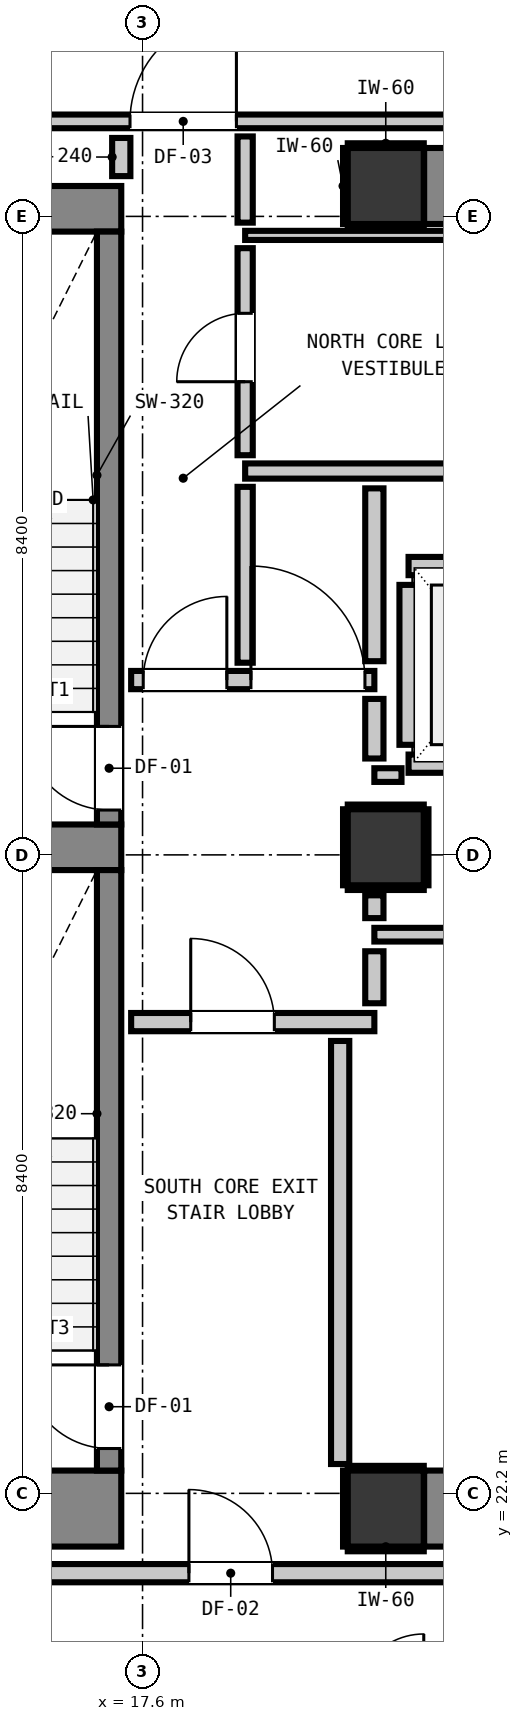
"""IFC4 building model, lengths in metres.
Left out: names, types, materials, properties, quantities, classifications, styles, units other than length and angle.
Written with IfcOpenShell. Run it as: python <this file> out.ifc"""

import sys

from ifc_helpers import new_model, si_unit, direction, frame, frame_2d, origin, origin_2d, place, context, subcontext, project, spatial, rectangle, extrude, element, fill, save


model = new_model("IFC4")
c1 = context("Model", 3, precision=1e-05, world=origin(), true_north=direction((0.0, 1.0)))
c2 = subcontext(c1, "Body", "Model", "MODEL_VIEW")
j1 = project(units=[si_unit("LENGTHUNIT", "METRE"), si_unit("PLANEANGLEUNIT", "RADIAN")], contexts=[c1])
p1 = place(None, origin())
s1 = spatial("IfcSite", under=j1, at=p1, CompositionType="ELEMENT")
p2 = place(p1, origin())
s2 = spatial("IfcBuilding", under=s1, at=p2, CompositionType="ELEMENT")
p3 = place(p2, frame((0.0, 0.0, 159.2)))
s3 = spatial("IfcBuildingStorey", under=s2, at=p3, CompositionType="ELEMENT", Elevation=159.2)
for number, where, z_axis, x_axis in (
    (1, (20.8, 22.0, 0.0), (0.0, 0.0, 1.0), (1.0, 0.0, 0.0)),
    (2, (20.8, 39.4, 0.0), (0.0, 0.0, 1.0), (1.0, 0.0, 0.0)),
):
    element("IfcColumn", number, at=place(p3, frame(where, z_axis=z_axis, x_axis=x_axis)), inside=s3, PredefinedType="COLUMN", context=c2, shape_type="SweptSolid", body=[
        extrude(rectangle(XDim=1.0, YDim=1.0, at=origin_2d()), origin(), (0.0, 0.0, 1.0), 3.32),
    ])
p4 = place(p3, frame((13.24, 22.0, 0.0), z_axis=(0.0, 0.0, 1.0), x_axis=(1.0, 0.0, 0.0)))
e3 = element("IfcWall", 3, at=p4, inside=s3, PredefinedType="SHEAR", context=c2, shape_type="SweptSolid", body=[
    extrude(rectangle(XDim=4.08, YDim=1.0, at=frame_2d((2.04, 0.0))), origin(), (0.0, 0.0, 1.0), 3.32),
])
p5 = place(p3, frame((13.24, 39.1, 0.0), z_axis=(0.0, 0.0, 1.0), x_axis=(1.0, 0.0, 0.0)))
e4 = element("IfcWall", 4, at=p5, inside=s3, PredefinedType="SHEAR", context=c2, shape_type="SweptSolid", body=[
    extrude(rectangle(XDim=4.08, YDim=0.6, at=frame_2d((2.04, 0.0))), origin(), (0.0, 0.0, 1.0), 3.32),
])
p6 = place(p3, frame((13.905, 30.7, 0.0), z_axis=(0.0, 0.0, 1.0), x_axis=(1.0, 0.0, 0.0)))
e5 = element("IfcWall", 5, at=p6, inside=s3, PredefinedType="SHEAR", context=c2, shape_type="SweptSolid", body=[
    extrude(rectangle(XDim=3.415, YDim=0.6, at=frame_2d((1.708, 0.0))), origin(), (0.0, 0.0, 1.0), 3.32),
])
for number, where, z_axis, x_axis in (
    (6, (21.305, 22.0, 0.0), (0.0, 0.0, 1.0), (1.0, 0.0, 0.0)),
    (7, (21.305, 39.4, 0.0), (0.0, 0.0, 1.0), (1.0, 0.0, 0.0)),
):
    element("IfcWall", number, at=place(p3, frame(where, z_axis=z_axis, x_axis=x_axis)), inside=s3, PredefinedType="SHEAR", context=c2, shape_type="SweptSolid", body=[
        extrude(rectangle(XDim=7.39, YDim=1.0, at=frame_2d((3.695, 0.0))), origin(), (0.0, 0.0, 1.0), 3.32),
    ])
p7 = place(p3, frame((17.16, 31.0, 0.0), z_axis=(0.0, 0.0, 1.0), x_axis=(0.0, 1.0, 0.0)))
e8 = element("IfcWall", 8, at=p7, inside=s3, PredefinedType="SHEAR", context=c2, shape_type="SweptSolid", body=[
    extrude(rectangle(XDim=7.8, YDim=0.32, at=frame_2d((3.9, 0.0))), origin(), (0.0, 0.0, 1.0), 3.32),
])
p8 = place(p7, frame((0.19, 0.0, 0.0)))
e9 = element("IfcOpeningElement", 9, at=p8, cuts=e8, PredefinedType="OPENING", context=c2, shape_type="SweptSolid", body=[
    extrude(rectangle(XDim=1.1, YDim=2.15, at=frame_2d((0.55, 1.075))), frame((0.0, 0.17, 0.0), z_axis=(0.0, -1.0, 0.0), x_axis=(1.0, 0.0, 0.0)), (0.0, 0.0, 1.0), 0.34),
])
p9 = place(p3, frame((17.16, 22.5, 0.0), z_axis=(0.0, 0.0, 1.0), x_axis=(0.0, 1.0, 0.0)))
e10 = element("IfcWall", 10, at=p9, inside=s3, PredefinedType="SHEAR", context=c2, shape_type="SweptSolid", body=[
    extrude(rectangle(XDim=7.9, YDim=0.32, at=frame_2d((3.95, 0.0))), origin(), (0.0, 0.0, 1.0), 3.32),
])
p10 = place(p9, frame((0.29, 0.0, 0.0)))
e11 = element("IfcOpeningElement", 11, at=p10, cuts=e10, PredefinedType="OPENING", context=c2, shape_type="SweptSolid", body=[
    extrude(rectangle(XDim=1.1, YDim=2.15, at=frame_2d((0.55, 1.075))), frame((0.0, 0.17, 0.0), z_axis=(0.0, -1.0, 0.0), x_axis=(1.0, 0.0, 0.0)), (0.0, 0.0, 1.0), 0.34),
])
p11 = place(p3, frame((20.8, 30.7, 0.0), z_axis=(0.0, 0.0, 1.0), x_axis=(1.0, 0.0, 0.0)))
e12 = element("IfcColumn", 12, at=p11, inside=s3, PredefinedType="COLUMN", context=c2, shape_type="SweptSolid", body=[
    extrude(rectangle(XDim=1.0, YDim=1.0, at=origin_2d()), origin(), (0.0, 0.0, 1.0), 3.32),
])
for number, where, z_axis, x_axis in (
    (13, (21.1, 31.8, 0.0), (0.0, 0.0, 1.0), (1.0, 0.0, 0.0)),
    (14, (21.1, 34.4, 0.0), (0.0, 0.0, 1.0), (1.0, 0.0, 0.0)),
):
    element("IfcWall", number, at=place(p3, frame(where, z_axis=z_axis, x_axis=x_axis)), inside=s3, PredefinedType="PARTITIONING", context=c2, shape_type="SweptSolid", body=[
        extrude(rectangle(XDim=2.2, YDim=0.24, at=frame_2d((1.1, 0.0))), origin(), (0.0, 0.0, 1.0), 3.08),
    ])
p12 = place(p3, frame((21.1, 32.048, 0.0), z_axis=(0.0, 0.0, 1.0), x_axis=(0.0, 1.0, 0.0)))
e15 = element("IfcWall", 15, at=p12, inside=s3, PredefinedType="PARTITIONING", context=c2, shape_type="SweptSolid", body=[
    extrude(rectangle(XDim=2.104, YDim=0.24, at=frame_2d((1.052, 0.0))), origin(), (0.0, 0.0, 1.0), 2.315),
])
p13 = place(p3, frame((9.407, 21.15, 0.0), z_axis=(0.0, 0.0, 1.0), x_axis=(1.0, 0.0, 0.0)))
e16 = element("IfcWall", 16, at=p13, inside=s3, PredefinedType="PARTITIONING", context=c2, shape_type="SweptSolid", body=[
    extrude(rectangle(XDim=27.532, YDim=0.24, at=frame_2d((13.766, 0.0))), origin(), (0.0, 0.0, 1.0), 3.08),
])
p14 = place(p13, frame((8.803, 0.0, 0.0)))
e17 = element("IfcOpeningElement", 17, at=p14, cuts=e16, PredefinedType="OPENING", context=c2, shape_type="SweptSolid", body=[
    extrude(rectangle(XDim=1.1, YDim=2.15, at=frame_2d((0.55, 1.075))), frame((0.0, 0.13, 0.0), z_axis=(0.0, -1.0, 0.0), x_axis=(1.0, 0.0, 0.0)), (0.0, 0.0, 1.0), 0.26),
])
p15 = place(p13, frame((1.192, 0.0, 0.0)))
e18 = element("IfcOpeningElement", 18, at=p15, cuts=e16, PredefinedType="OPENING", context=c2, shape_type="SweptSolid", body=[
    extrude(rectangle(XDim=1.4, YDim=2.15, at=frame_2d((0.7, 1.075))), frame((0.0, 0.13, 0.0), z_axis=(0.0, -1.0, 0.0), x_axis=(1.0, 0.0, 0.0)), (0.0, 0.0, 1.0), 0.26),
])
p16 = place(p3, frame((17.45, 28.4, 0.0), z_axis=(0.0, 0.0, 1.0), x_axis=(1.0, 0.0, 0.0)))
e19 = element("IfcWall", 19, at=p16, inside=s3, PredefinedType="PARTITIONING", context=c2, shape_type="SweptSolid", body=[
    extrude(rectangle(XDim=3.2, YDim=0.24, at=frame_2d((1.6, 0.0))), origin(), (0.0, 0.0, 1.0), 3.08),
])
p17 = place(p16, frame((0.784, 0.0, 0.0)))
e20 = element("IfcOpeningElement", 20, at=p17, cuts=e19, PredefinedType="OPENING", context=c2, shape_type="SweptSolid", body=[
    extrude(rectangle(XDim=1.1, YDim=2.15, at=frame_2d((0.55, 1.075))), frame((0.0, 0.13, 0.0), z_axis=(0.0, -1.0, 0.0), x_axis=(1.0, 0.0, 0.0)), (0.0, 0.0, 1.0), 0.26),
])
p18 = place(p3, frame((17.45, 32.9, 0.0), z_axis=(0.0, 0.0, 1.0), x_axis=(1.0, 0.0, 0.0)))
e21 = element("IfcWall", 21, at=p18, inside=s3, PredefinedType="PARTITIONING", context=c2, shape_type="SweptSolid", body=[
    extrude(rectangle(XDim=3.2, YDim=0.24, at=frame_2d((1.6, 0.0))), origin(), (0.0, 0.0, 1.0), 3.08),
])
p19 = place(p18, frame((0.159, 0.0, 0.0)))
e22 = element("IfcOpeningElement", 22, at=p19, cuts=e21, PredefinedType="OPENING", context=c2, shape_type="SweptSolid", body=[
    extrude(rectangle(XDim=1.1, YDim=2.15, at=frame_2d((0.55, 1.075))), frame((0.0, 0.13, 0.0), z_axis=(0.0, -1.0, 0.0), x_axis=(1.0, 0.0, 0.0)), (0.0, 0.0, 1.0), 0.26),
])
p20 = place(p18, frame((1.576, 0.0, 0.0)))
e23 = element("IfcOpeningElement", 23, at=p20, cuts=e21, PredefinedType="OPENING", context=c2, shape_type="SweptSolid", body=[
    extrude(rectangle(XDim=1.5, YDim=2.15, at=frame_2d((0.75, 1.075))), frame((0.0, 0.13, 0.0), z_axis=(0.0, -1.0, 0.0), x_axis=(1.0, 0.0, 0.0)), (0.0, 0.0, 1.0), 0.26),
])
p21 = place(p3, frame((18.95, 35.65, 0.0), z_axis=(0.0, 0.0, 1.0), x_axis=(1.0, 0.0, 0.0)))
e24 = element("IfcWall", 24, at=p21, inside=s3, PredefinedType="PARTITIONING", context=c2, shape_type="SweptSolid", body=[
    extrude(rectangle(XDim=11.025, YDim=0.2, at=frame_2d((5.513, 0.0))), origin(), (0.0, 0.0, 1.0), 3.08),
])
p22 = place(p3, frame((20.65, 29.55, 0.0), z_axis=(0.0, 0.0, 1.0), x_axis=(1.0, 0.0, 0.0)))
e25 = element("IfcWall", 25, at=p22, inside=s3, PredefinedType="PARTITIONING", context=c2, shape_type="SweptSolid", body=[
    extrude(rectangle(XDim=9.325, YDim=0.18, at=frame_2d((4.663, 0.0))), origin(), (0.0, 0.0, 1.0), 3.08),
])
p23 = place(p3, frame((20.65, 31.65, 0.0), z_axis=(0.0, 0.0, 1.0), x_axis=(1.0, 0.0, 0.0)))
e26 = element("IfcWall", 26, at=p23, inside=s3, PredefinedType="PARTITIONING", context=c2, shape_type="SweptSolid", body=[
    extrude(rectangle(XDim=0.357, YDim=0.18, at=frame_2d((0.179, 0.0))), origin(), (0.0, 0.0, 1.0), 3.08),
])
p24 = place(p3, frame((9.407, 40.25, 0.0), z_axis=(0.0, 0.0, 1.0), x_axis=(1.0, 0.0, 0.0)))
e27 = element("IfcWall", 27, at=p24, inside=s3, PredefinedType="PARTITIONING", context=c2, shape_type="SweptSolid", body=[
    extrude(rectangle(XDim=39.386, YDim=0.18, at=frame_2d((19.693, 0.0))), origin(), (0.0, 0.0, 1.0), 3.08),
])
p25 = place(p24, frame((8.028, 0.0, 0.0)))
e28 = element("IfcOpeningElement", 28, at=p25, cuts=e27, PredefinedType="OPENING", context=c2, shape_type="SweptSolid", body=[
    extrude(rectangle(XDim=1.4, YDim=2.15, at=frame_2d((0.7, 1.075))), frame((0.0, 0.1, 0.0), z_axis=(0.0, -1.0, 0.0), x_axis=(1.0, 0.0, 0.0)), (0.0, 0.0, 1.0), 0.2),
])
p26 = place(p24, frame((1.192, 0.0, 0.0)))
e29 = element("IfcOpeningElement", 29, at=p26, cuts=e27, PredefinedType="OPENING", context=c2, shape_type="SweptSolid", body=[
    extrude(rectangle(XDim=1.4, YDim=2.15, at=frame_2d((0.7, 1.075))), frame((0.0, 0.1, 0.0), z_axis=(0.0, -1.0, 0.0), x_axis=(1.0, 0.0, 0.0)), (0.0, 0.0, 1.0), 0.2),
])
p27 = place(p24, frame((28.643, 0.0, 0.0)))
e30 = element("IfcOpeningElement", 30, at=p27, cuts=e27, PredefinedType="OPENING", context=c2, shape_type="SweptSolid", body=[
    extrude(rectangle(XDim=1.4, YDim=2.15, at=frame_2d((0.7, 1.075))), frame((0.0, 0.1, 0.0), z_axis=(0.0, -1.0, 0.0), x_axis=(1.0, 0.0, 0.0)), (0.0, 0.0, 1.0), 0.2),
])
p28 = place(p24, frame((34.394, 0.0, 0.0)))
e31 = element("IfcOpeningElement", 31, at=p28, cuts=e27, PredefinedType="OPENING", context=c2, shape_type="SweptSolid", body=[
    extrude(rectangle(XDim=0.9, YDim=2.1, at=frame_2d((0.45, 1.05))), frame((0.0, 0.1, 0.0), z_axis=(0.0, -1.0, 0.0), x_axis=(1.0, 0.0, 0.0)), (0.0, 0.0, 1.0), 0.2),
])
p29 = place(p3, frame((18.95, 38.75, 0.0), z_axis=(0.0, 0.0, 1.0), x_axis=(1.0, 0.0, 0.0)))
e32 = element("IfcWall", 32, at=p29, inside=s3, PredefinedType="PARTITIONING", context=c2, shape_type="SweptSolid", body=[
    extrude(rectangle(XDim=13.56, YDim=0.12, at=frame_2d((6.78, 0.0))), origin(), (0.0, 0.0, 1.0), 3.08),
])
p30 = place(p3, frame((17.32, 39.53, 0.0), z_axis=(0.0, 0.0, 1.0), x_axis=(0.0, 1.0, 0.0)))
e33 = element("IfcWall", 33, at=p30, inside=s3, PredefinedType="PARTITIONING", context=c2, shape_type="SweptSolid", body=[
    extrude(rectangle(XDim=0.502, YDim=0.24, at=frame_2d((0.251, 0.0))), origin(), (0.0, 0.0, 1.0), 3.08),
])
p31 = place(p3, frame((20.2, 22.586, 0.0), z_axis=(0.0, 0.0, 1.0), x_axis=(0.0, 1.0, 0.0)))
e34 = element("IfcWall", 34, at=p31, inside=s3, PredefinedType="PARTITIONING", context=c2, shape_type="SweptSolid", body=[
    extrude(rectangle(XDim=5.566, YDim=0.24, at=frame_2d((2.783, 0.0))), origin(), (0.0, 0.0, 1.0), 3.08),
])
p32 = place(p3, frame((20.65, 28.648, 0.0), z_axis=(0.0, 0.0, 1.0), x_axis=(0.0, 1.0, 0.0)))
e35 = element("IfcWall", 35, at=p32, inside=s3, PredefinedType="PARTITIONING", context=c2, shape_type="SweptSolid", body=[
    extrude(rectangle(XDim=0.684, YDim=0.24, at=frame_2d((0.342, 0.0))), origin(), (0.0, 0.0, 1.0), 2.315),
])
p33 = place(p3, frame((20.65, 29.768, 0.0), z_axis=(0.0, 0.0, 1.0), x_axis=(0.0, 1.0, 0.0)))
e36 = element("IfcWall", 36, at=p33, inside=s3, PredefinedType="PARTITIONING", context=c2, shape_type="SweptSolid", body=[
    extrude(rectangle(XDim=0.3, YDim=0.24, at=frame_2d((0.15, 0.0))), origin(), (0.0, 0.0, 1.0), 2.315),
])
p34 = place(p3, frame((20.65, 31.868, 0.0), z_axis=(0.0, 0.0, 1.0), x_axis=(0.0, 1.0, 0.0)))
e37 = element("IfcWall", 37, at=p34, inside=s3, PredefinedType="PARTITIONING", context=c2, shape_type="SweptSolid", body=[
    extrude(rectangle(XDim=0.784, YDim=0.24, at=frame_2d((0.392, 0.0))), origin(), (0.0, 0.0, 1.0), 2.315),
])
p35 = place(p3, frame((20.65, 33.148, 0.0), z_axis=(0.0, 0.0, 1.0), x_axis=(0.0, 1.0, 0.0)))
e38 = element("IfcWall", 38, at=p35, inside=s3, PredefinedType="PARTITIONING", context=c2, shape_type="SweptSolid", body=[
    extrude(rectangle(XDim=2.274, YDim=0.24, at=frame_2d((1.137, 0.0))), origin(), (0.0, 0.0, 1.0), 2.315),
])
p36 = place(p3, frame((18.95, 33.128, 0.0), z_axis=(0.0, 0.0, 1.0), x_axis=(0.0, 1.0, 0.0)))
e39 = element("IfcWall", 39, at=p36, inside=s3, PredefinedType="PARTITIONING", context=c2, shape_type="SweptSolid", body=[
    extrude(rectangle(XDim=2.314, YDim=0.2, at=frame_2d((1.157, 0.0))), origin(), (0.0, 0.0, 1.0), 3.08),
])
p37 = place(p3, frame((18.95, 35.858, 0.0), z_axis=(0.0, 0.0, 1.0), x_axis=(0.0, 1.0, 0.0)))
e40 = element("IfcWall", 40, at=p37, inside=s3, PredefinedType="PARTITIONING", context=c2, shape_type="SweptSolid", body=[
    extrude(rectangle(XDim=2.724, YDim=0.2, at=frame_2d((1.362, 0.0))), origin(), (0.0, 0.0, 1.0), 3.08),
])
p38 = place(p37, frame((0.967, 0.0, 0.0)))
e41 = element("IfcOpeningElement", 41, at=p38, cuts=e40, PredefinedType="OPENING", context=c2, shape_type="SweptSolid", body=[
    extrude(rectangle(XDim=0.9, YDim=2.1, at=frame_2d((0.45, 1.05))), frame((0.0, 0.11, 0.0), z_axis=(0.0, -1.0, 0.0), x_axis=(1.0, 0.0, 0.0)), (0.0, 0.0, 1.0), 0.22),
])
p39 = place(p3, frame((18.95, 38.918, 0.0), z_axis=(0.0, 0.0, 1.0), x_axis=(0.0, 1.0, 0.0)))
e42 = element("IfcWall", 42, at=p39, inside=s3, PredefinedType="PARTITIONING", context=c2, shape_type="SweptSolid", body=[
    extrude(rectangle(XDim=1.134, YDim=0.2, at=frame_2d((0.567, 0.0))), origin(), (0.0, 0.0, 1.0), 3.08),
])
for number, where, z_axis, x_axis in (
    (43, (20.3, 21.468, 0.0), (0.0, 0.0, 1.0), (1.0, 0.0, 0.0)),
    (44, (20.3, 22.532, 0.0), (0.0, 0.0, 1.0), (1.0, 0.0, 0.0)),
    (45, (20.268, 21.5, 0.0), (0.0, 0.0, 1.0), (0.0, 1.0, 0.0)),
    (46, (20.3, 38.868, 0.0), (0.0, 0.0, 1.0), (1.0, 0.0, 0.0)),
    (47, (20.3, 39.932, 0.0), (0.0, 0.0, 1.0), (1.0, 0.0, 0.0)),
    (48, (20.268, 38.9, 0.0), (0.0, 0.0, 1.0), (0.0, 1.0, 0.0)),
    (49, (20.3, 30.168, 0.0), (0.0, 0.0, 1.0), (1.0, 0.0, 0.0)),
    (50, (20.3, 31.232, 0.0), (0.0, 0.0, 1.0), (1.0, 0.0, 0.0)),
    (51, (20.268, 30.2, 0.0), (0.0, 0.0, 1.0), (0.0, 1.0, 0.0)),
    (52, (21.332, 30.2, 0.0), (0.0, 0.0, 1.0), (0.0, 1.0, 0.0)),
):
    element("IfcWall", number, at=place(p3, frame(where, z_axis=z_axis, x_axis=x_axis)), inside=s3, PredefinedType="PARTITIONING", context=c2, shape_type="SweptSolid", body=[
        extrude(rectangle(XDim=1.0, YDim=0.06, at=frame_2d((0.5, 0.0))), origin(), (0.0, 0.0, 1.0), 1.45),
    ])
p40 = place(p8, origin())
e53 = element("IfcDoor", 53, at=p40, inside=s3, OperationType="SINGLE_SWING_RIGHT", PredefinedType="DOOR", context=c2, shape_type="SweptSolid", body=[
    extrude(rectangle(XDim=1.1, YDim=2.15, at=frame_2d((0.55, 1.075))), frame((0.0, 0.025, 0.0), z_axis=(0.0, -1.0, 0.0), x_axis=(1.0, 0.0, 0.0)), (0.0, 0.0, 1.0), 0.05),
])
fill(e9, e53)
p41 = place(p10, origin())
e54 = element("IfcDoor", 54, at=p41, inside=s3, OperationType="SINGLE_SWING_RIGHT", PredefinedType="DOOR", context=c2, shape_type="SweptSolid", body=[
    extrude(rectangle(XDim=1.1, YDim=2.15, at=frame_2d((0.55, 1.075))), frame((0.0, 0.025, 0.0), z_axis=(0.0, -1.0, 0.0), x_axis=(1.0, 0.0, 0.0)), (0.0, 0.0, 1.0), 0.05),
])
fill(e11, e54)
p42 = place(p17, origin())
e55 = element("IfcDoor", 55, at=p42, inside=s3, OperationType="SINGLE_SWING_LEFT", PredefinedType="DOOR", context=c2, shape_type="SweptSolid", body=[
    extrude(rectangle(XDim=1.1, YDim=2.15, at=frame_2d((0.55, 1.075))), frame((0.0, 0.025, 0.0), z_axis=(0.0, -1.0, 0.0), x_axis=(1.0, 0.0, 0.0)), (0.0, 0.0, 1.0), 0.05),
])
fill(e20, e55)
p43 = place(p19, origin())
e56 = element("IfcDoor", 56, at=p43, inside=s3, OperationType="SINGLE_SWING_RIGHT", PredefinedType="DOOR", context=c2, shape_type="SweptSolid", body=[
    extrude(rectangle(XDim=1.1, YDim=2.15, at=frame_2d((0.55, 1.075))), frame((0.0, 0.025, 0.0), z_axis=(0.0, -1.0, 0.0), x_axis=(1.0, 0.0, 0.0)), (0.0, 0.0, 1.0), 0.05),
])
fill(e22, e56)
p44 = place(p14, origin())
e57 = element("IfcDoor", 57, at=p44, inside=s3, OperationType="SINGLE_SWING_LEFT", PredefinedType="DOOR", context=c2, shape_type="SweptSolid", body=[
    extrude(rectangle(XDim=1.1, YDim=2.15, at=frame_2d((0.55, 1.075))), frame((0.0, 0.025, 0.0), z_axis=(0.0, -1.0, 0.0), x_axis=(1.0, 0.0, 0.0)), (0.0, 0.0, 1.0), 0.05),
])
fill(e17, e57)
p45 = place(p25, origin())
e58 = element("IfcDoor", 58, at=p45, inside=s3, OperationType="SINGLE_SWING_RIGHT", PredefinedType="DOOR", context=c2, shape_type="SweptSolid", body=[
    extrude(rectangle(XDim=1.4, YDim=2.15, at=frame_2d((0.7, 1.075))), frame((0.0, 0.025, 0.0), z_axis=(0.0, -1.0, 0.0), x_axis=(1.0, 0.0, 0.0)), (0.0, 0.0, 1.0), 0.05),
])
fill(e28, e58)
p46 = place(p20, origin())
e59 = element("IfcDoor", 59, at=p46, inside=s3, OperationType="SINGLE_SWING_LEFT", PredefinedType="DOOR", context=c2, shape_type="SweptSolid", body=[
    extrude(rectangle(XDim=1.5, YDim=2.15, at=frame_2d((0.75, 1.075))), frame((0.0, 0.025, 0.0), z_axis=(0.0, -1.0, 0.0), x_axis=(1.0, 0.0, 0.0)), (0.0, 0.0, 1.0), 0.05),
])
fill(e23, e59)
p47 = place(p38, origin())
e60 = element("IfcDoor", 60, at=p47, inside=s3, OperationType="SINGLE_SWING_LEFT", PredefinedType="DOOR", context=c2, shape_type="SweptSolid", body=[
    extrude(rectangle(XDim=0.9, YDim=2.1, at=frame_2d((0.45, 1.05))), frame((0.0, 0.025, 0.0), z_axis=(0.0, -1.0, 0.0), x_axis=(1.0, 0.0, 0.0)), (0.0, 0.0, 1.0), 0.05),
])
fill(e41, e60)
save(model, sys.argv[1])
